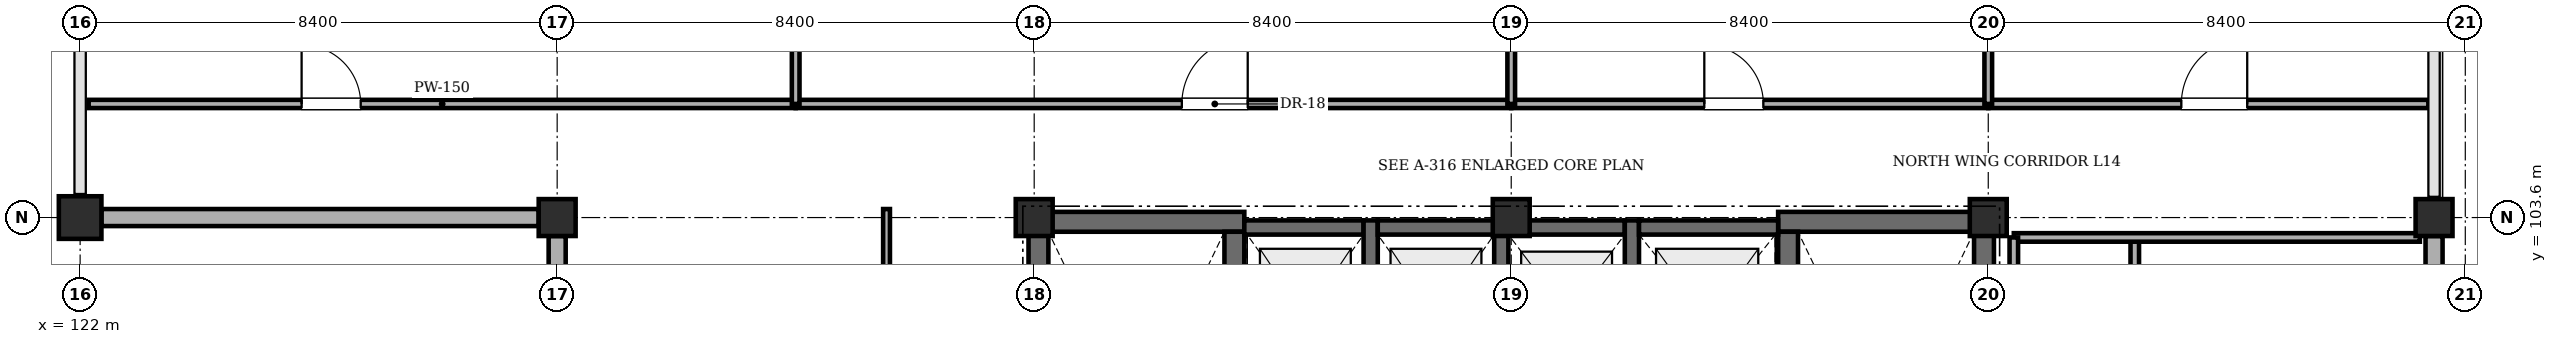
"""IFC4 building model, lengths in metres.
Left out: names, types, materials, properties, quantities, classifications, styles, units other than length and angle.
Written with IfcOpenShell. Run it as: python <this file> out.ifc"""

import sys

from ifc_helpers import new_model, si_unit, direction, frame, frame_2d, origin, origin_2d, place, context, subcontext, project, spatial, rectangle, extrude, element, fill, save


model = new_model("IFC4")
c1 = context("Model", 3, precision=1e-05, world=origin(), true_north=direction((0.0, 1.0)))
c2 = subcontext(c1, "Body", "Model", "MODEL_VIEW")
j1 = project(units=[si_unit("LENGTHUNIT", "METRE"), si_unit("PLANEANGLEUNIT", "RADIAN")], contexts=[c1])
p1 = place(None, origin())
s1 = spatial("IfcSite", under=j1, at=p1, CompositionType="ELEMENT")
p2 = place(p1, origin())
s2 = spatial("IfcBuilding", under=s1, at=p2, CompositionType="ELEMENT")
p3 = place(p2, frame((0.0, 0.0, 57.0)))
s3 = spatial("IfcBuildingStorey", under=s2, at=p3, CompositionType="ELEMENT", Elevation=57.0)
p4 = place(p3, frame((122.0, 103.6, 0.0), z_axis=(0.0, 0.0, 1.0), x_axis=(1.0, 0.0, 0.0)))
e1 = element("IfcColumn", 1, at=p4, inside=s3, PredefinedType="COLUMN", context=c2, shape_type="SweptSolid", body=[
    extrude(rectangle(XDim=0.75, YDim=0.75, at=origin_2d()), origin(), (0.0, 0.0, 1.0), 4.02),
])
for number, where, z_axis, x_axis in (
    (2, (130.4, 103.6, 0.0), (0.0, 0.0, 1.0), (1.0, 0.0, 0.0)),
    (3, (138.8, 103.6, 0.0), (0.0, 0.0, 1.0), (1.0, 0.0, 0.0)),
    (4, (147.2, 103.6, 0.0), (0.0, 0.0, 1.0), (1.0, 0.0, 0.0)),
    (5, (155.6, 103.6, 0.0), (0.0, 0.0, 1.0), (1.0, 0.0, 0.0)),
    (6, (163.45, 103.6, 0.0), (0.0, 0.0, 1.0), (1.0, 0.0, 0.0)),
):
    element("IfcColumn", number, at=place(p3, frame(where, z_axis=z_axis, x_axis=x_axis)), inside=s3, PredefinedType="COLUMN", context=c2, shape_type="SweptSolid", body=[
        extrude(rectangle(XDim=0.65, YDim=0.65, at=origin_2d()), origin(), (0.0, 0.0, 1.0), 4.02),
    ])
p5 = place(p3, frame((138.7, 103.525, 0.0), z_axis=(0.0, 0.0, 1.0), x_axis=(1.0, 0.0, 0.0)))
e7 = element("IfcWall", 7, at=p5, inside=s3, PredefinedType="SHEAR", context=c2, shape_type="SweptSolid", body=[
    extrude(rectangle(XDim=3.8, YDim=0.35, at=frame_2d((1.9, 0.0))), origin(), (0.0, 0.0, 1.0), 4.02),
])
p6 = place(p3, frame((138.875, 95.45, 0.0), z_axis=(0.0, 0.0, 1.0), x_axis=(0.0, 1.0, 0.0)))
e8 = element("IfcWall", 8, at=p6, inside=s3, PredefinedType="SHEAR", context=c2, shape_type="SweptSolid", body=[
    extrude(rectangle(XDim=7.9, YDim=0.35, at=frame_2d((3.95, 0.0))), origin(), (0.0, 0.0, 1.0), 4.02),
])
p7 = place(p3, frame((142.325, 95.45, 0.0), z_axis=(0.0, 0.0, 1.0), x_axis=(0.0, 1.0, 0.0)))
e9 = element("IfcWall", 9, at=p7, inside=s3, PredefinedType="SHEAR", context=c2, shape_type="SweptSolid", body=[
    extrude(rectangle(XDim=7.9, YDim=0.35, at=frame_2d((3.95, 0.0))), origin(), (0.0, 0.0, 1.0), 4.02),
])
p8 = place(p7, frame((0.22, 0.0, 0.0)))
e10 = element("IfcOpeningElement", 10, at=p8, cuts=e9, PredefinedType="OPENING", context=c2, shape_type="SweptSolid", body=[
    extrude(rectangle(XDim=1.15, YDim=2.15, at=frame_2d((0.575, 1.075))), frame((0.0, 0.185, 0.0), z_axis=(0.0, -1.0, 0.0), x_axis=(1.0, 0.0, 0.0)), (0.0, 0.0, 1.0), 0.37),
])
p9 = place(p3, frame((151.9, 103.525, 0.0), z_axis=(0.0, 0.0, 1.0), x_axis=(1.0, 0.0, 0.0)))
e11 = element("IfcWall", 11, at=p9, inside=s3, PredefinedType="SHEAR", context=c2, shape_type="SweptSolid", body=[
    extrude(rectangle(XDim=3.8, YDim=0.35, at=frame_2d((1.9, 0.0))), origin(), (0.0, 0.0, 1.0), 4.02),
])
p10 = place(p3, frame((152.075, 95.45, 0.0), z_axis=(0.0, 0.0, 1.0), x_axis=(0.0, 1.0, 0.0)))
e12 = element("IfcWall", 12, at=p10, inside=s3, PredefinedType="SHEAR", context=c2, shape_type="SweptSolid", body=[
    extrude(rectangle(XDim=7.9, YDim=0.35, at=frame_2d((3.95, 0.0))), origin(), (0.0, 0.0, 1.0), 4.02),
])
p11 = place(p10, frame((0.35, 0.0, 0.0)))
e13 = element("IfcOpeningElement", 13, at=p11, cuts=e12, PredefinedType="OPENING", context=c2, shape_type="SweptSolid", body=[
    extrude(rectangle(XDim=1.15, YDim=2.15, at=frame_2d((0.575, 1.075))), frame((0.0, 0.185, 0.0), z_axis=(0.0, -1.0, 0.0), x_axis=(1.0, 0.0, 0.0)), (0.0, 0.0, 1.0), 0.37),
])
p12 = place(p3, frame((155.525, 95.45, 0.0), z_axis=(0.0, 0.0, 1.0), x_axis=(0.0, 1.0, 0.0)))
e14 = element("IfcWall", 14, at=p12, inside=s3, PredefinedType="SHEAR", context=c2, shape_type="SweptSolid", body=[
    extrude(rectangle(XDim=7.9, YDim=0.35, at=frame_2d((3.95, 0.0))), origin(), (0.0, 0.0, 1.0), 4.02),
])
p13 = place(p3, frame((142.5, 103.425, 0.0), z_axis=(0.0, 0.0, 1.0), x_axis=(1.0, 0.0, 0.0)))
e15 = element("IfcWall", 15, at=p13, inside=s3, PredefinedType="SHEAR", context=c2, shape_type="SweptSolid", body=[
    extrude(rectangle(XDim=2.1, YDim=0.25, at=frame_2d((1.05, 0.0))), origin(), (0.0, 0.0, 1.0), 4.02),
])
p14 = place(p3, frame((144.725, 100.15, 0.0), z_axis=(0.0, 0.0, 1.0), x_axis=(0.0, 1.0, 0.0)))
e16 = element("IfcWall", 16, at=p14, inside=s3, PredefinedType="SHEAR", context=c2, shape_type="SweptSolid", body=[
    extrude(rectangle(XDim=3.4, YDim=0.25, at=frame_2d((1.7, 0.0))), origin(), (0.0, 0.0, 1.0), 4.02),
])
p15 = place(p3, frame((144.85, 103.425, 0.0), z_axis=(0.0, 0.0, 1.0), x_axis=(1.0, 0.0, 0.0)))
e17 = element("IfcWall", 17, at=p15, inside=s3, PredefinedType="SHEAR", context=c2, shape_type="SweptSolid", body=[
    extrude(rectangle(XDim=2.05, YDim=0.25, at=frame_2d((1.025, 0.0))), origin(), (0.0, 0.0, 1.0), 4.02),
])
p16 = place(p3, frame((147.025, 100.15, 0.0), z_axis=(0.0, 0.0, 1.0), x_axis=(0.0, 1.0, 0.0)))
e18 = element("IfcWall", 18, at=p16, inside=s3, PredefinedType="SHEAR", context=c2, shape_type="SweptSolid", body=[
    extrude(rectangle(XDim=3.4, YDim=0.25, at=frame_2d((1.7, 0.0))), origin(), (0.0, 0.0, 1.0), 4.02),
])
p17 = place(p3, frame((147.15, 103.425, 0.0), z_axis=(0.0, 0.0, 1.0), x_axis=(1.0, 0.0, 0.0)))
e19 = element("IfcWall", 19, at=p17, inside=s3, PredefinedType="SHEAR", context=c2, shape_type="SweptSolid", body=[
    extrude(rectangle(XDim=2.05, YDim=0.25, at=frame_2d((1.025, 0.0))), origin(), (0.0, 0.0, 1.0), 4.02),
])
p18 = place(p3, frame((149.325, 100.35, 0.0), z_axis=(0.0, 0.0, 1.0), x_axis=(0.0, 1.0, 0.0)))
e20 = element("IfcWall", 20, at=p18, inside=s3, PredefinedType="SHEAR", context=c2, shape_type="SweptSolid", body=[
    extrude(rectangle(XDim=3.2, YDim=0.25, at=frame_2d((1.6, 0.0))), origin(), (0.0, 0.0, 1.0), 4.02),
])
p19 = place(p3, frame((149.45, 103.425, 0.0), z_axis=(0.0, 0.0, 1.0), x_axis=(1.0, 0.0, 0.0)))
e21 = element("IfcWall", 21, at=p19, inside=s3, PredefinedType="SHEAR", context=c2, shape_type="SweptSolid", body=[
    extrude(rectangle(XDim=2.45, YDim=0.25, at=frame_2d((1.225, 0.0))), origin(), (0.0, 0.0, 1.0), 4.02),
])
p20 = place(p3, frame((163.45, 103.275, 0.0), z_axis=(0.0, 0.0, 1.0), x_axis=(0.0, -1.0, 0.0)))
e22 = element("IfcWall", 22, at=p20, inside=s3, PredefinedType="STANDARD", context=c2, shape_type="SweptSolid", body=[
    extrude(rectangle(XDim=7.75, YDim=0.3, at=frame_2d((3.875, 0.0))), origin(), (0.0, 0.0, 1.0), 3.32),
])
p21 = place(p20, frame((1.15, 0.0, 1.1)))
e23 = element("IfcOpeningElement", 23, at=p21, cuts=e22, PredefinedType="OPENING", context=c2, shape_type="SweptSolid", body=[
    extrude(rectangle(XDim=1.4, YDim=1.4, at=frame_2d((0.7, 0.7))), frame((0.0, 0.16, 0.0), z_axis=(0.0, -1.0, 0.0), x_axis=(1.0, 0.0, 0.0)), (0.0, 0.0, 1.0), 0.32),
])
p22 = place(p3, frame((130.4, 95.525, 0.0), z_axis=(0.0, 0.0, 1.0), x_axis=(0.0, 1.0, 0.0)))
e24 = element("IfcWall", 24, at=p22, inside=s3, PredefinedType="STANDARD", context=c2, shape_type="SweptSolid", body=[
    extrude(rectangle(XDim=7.75, YDim=0.3, at=frame_2d((3.875, 0.0))), origin(), (0.0, 0.0, 1.0), 3.32),
])
p23 = place(p22, frame((2.4, 0.0, 1.0)))
e25 = element("IfcOpeningElement", 25, at=p23, cuts=e24, PredefinedType="OPENING", context=c2, shape_type="SweptSolid", body=[
    extrude(rectangle(XDim=1.8, YDim=1.8, at=frame_2d((0.9, 0.9))), frame((0.0, 0.16, 0.0), z_axis=(0.0, -1.0, 0.0), x_axis=(1.0, 0.0, 0.0)), (0.0, 0.0, 1.0), 0.32),
])
p24 = place(p3, frame((130.075, 103.6, 0.0), z_axis=(0.0, 0.0, 1.0), x_axis=(-1.0, 0.0, 0.0)))
e26 = element("IfcWall", 26, at=p24, inside=s3, PredefinedType="STANDARD", context=c2, shape_type="SweptSolid", body=[
    extrude(rectangle(XDim=7.7, YDim=0.3, at=frame_2d((3.85, 0.0))), origin(), (0.0, 0.0, 1.0), 3.32),
])
p25 = place(p3, frame((158.18, 94.68, 0.0), z_axis=(0.0, 0.0, 1.0), x_axis=(0.0, 1.0, 0.0)))
e27 = element("IfcWall", 27, at=p25, inside=s3, PredefinedType="PARTITIONING", context=c2, shape_type="SweptSolid", body=[
    extrude(rectangle(XDim=8.57, YDim=0.15, at=frame_2d((4.285, 0.0))), origin(), (0.0, 0.0, 1.0), 4.02),
])
p26 = place(p25, frame((0.8, 0.0, 0.0)))
e28 = element("IfcOpeningElement", 28, at=p26, cuts=e27, PredefinedType="OPENING", context=c2, shape_type="SweptSolid", body=[
    extrude(rectangle(XDim=1.0, YDim=2.12, at=frame_2d((0.5, 1.06))), frame((0.0, 0.085, 0.0), z_axis=(0.0, -1.0, 0.0), x_axis=(1.0, 0.0, 0.0)), (0.0, 0.0, 1.0), 0.17),
])
p27 = place(p25, frame((3.5, 0.0, 0.0)))
e29 = element("IfcOpeningElement", 29, at=p27, cuts=e27, PredefinedType="OPENING", context=c2, shape_type="SweptSolid", body=[
    extrude(rectangle(XDim=0.92, YDim=2.1, at=frame_2d((0.46, 1.05))), frame((0.0, 0.085, 0.0), z_axis=(0.0, -1.0, 0.0), x_axis=(1.0, 0.0, 0.0)), (0.0, 0.0, 1.0), 0.17),
])
p28 = place(p25, frame((6.4, 0.0, 0.0)))
e30 = element("IfcOpeningElement", 30, at=p28, cuts=e27, PredefinedType="OPENING", context=c2, shape_type="SweptSolid", body=[
    extrude(rectangle(XDim=0.92, YDim=2.1, at=frame_2d((0.46, 1.05))), frame((0.0, 0.085, 0.0), z_axis=(0.0, -1.0, 0.0), x_axis=(1.0, 0.0, 0.0)), (0.0, 0.0, 1.0), 0.17),
])
p29 = place(p3, frame((156.05, 103.25, 0.0), z_axis=(0.0, 0.0, 1.0), x_axis=(1.0, 0.0, 0.0)))
e31 = element("IfcWall", 31, at=p29, inside=s3, PredefinedType="PARTITIONING", context=c2, shape_type="SweptSolid", body=[
    extrude(rectangle(XDim=7.15, YDim=0.15, at=frame_2d((3.575, 0.0))), origin(), (0.0, 0.0, 1.0), 4.02),
])
p30 = place(p3, frame((156.05, 94.68, 0.0), z_axis=(0.0, 0.0, 1.0), x_axis=(0.0, 1.0, 0.0)))
e32 = element("IfcWall", 32, at=p30, inside=s3, PredefinedType="PARTITIONING", context=c2, shape_type="SweptSolid", body=[
    extrude(rectangle(XDim=8.57, YDim=0.15, at=frame_2d((4.285, 0.0))), origin(), (0.0, 0.0, 1.0), 4.02),
])
p31 = place(p3, frame((136.2, 94.68, 0.0), z_axis=(0.0, 0.0, 1.0), x_axis=(0.0, 1.0, 0.0)))
e33 = element("IfcWall", 33, at=p31, inside=s3, PredefinedType="PARTITIONING", context=c2, shape_type="SweptSolid", body=[
    extrude(rectangle(XDim=9.07, YDim=0.12, at=frame_2d((4.535, 0.0))), origin(), (0.0, 0.0, 1.0), 4.02),
])
p32 = place(p3, frame((122.15, 105.6, 0.0), z_axis=(0.0, 0.0, 1.0), x_axis=(1.0, 0.0, 0.0)))
e34 = element("IfcWall", 34, at=p32, inside=s3, PredefinedType="PARTITIONING", context=c2, shape_type="SweptSolid", body=[
    extrude(rectangle(XDim=12.45, YDim=0.145, at=frame_2d((6.225, 0.0))), origin(), (0.0, 0.0, 1.0), 4.02),
])
p33 = place(p32, frame((3.75, 0.0, 0.0)))
e35 = element("IfcOpeningElement", 35, at=p33, cuts=e34, PredefinedType="OPENING", context=c2, shape_type="SweptSolid", body=[
    extrude(rectangle(XDim=1.04, YDim=2.16, at=frame_2d((0.52, 1.08))), frame((0.0, 0.083, 0.0), z_axis=(0.0, -1.0, 0.0), x_axis=(1.0, 0.0, 0.0)), (0.0, 0.0, 1.0), 0.165),
])
p34 = place(p3, frame((134.6, 105.6, 0.0), z_axis=(0.0, 0.0, 1.0), x_axis=(1.0, 0.0, 0.0)))
e36 = element("IfcWall", 36, at=p34, inside=s3, PredefinedType="PARTITIONING", context=c2, shape_type="SweptSolid", body=[
    extrude(rectangle(XDim=12.6, YDim=0.145, at=frame_2d((6.3, 0.0))), origin(), (0.0, 0.0, 1.0), 4.02),
])
p35 = place(p34, frame((6.8, 0.0, 0.0)))
e37 = element("IfcOpeningElement", 37, at=p35, cuts=e36, PredefinedType="OPENING", context=c2, shape_type="SweptSolid", body=[
    extrude(rectangle(XDim=1.16, YDim=2.2, at=frame_2d((0.58, 1.1))), frame((0.0, 0.083, 0.0), z_axis=(0.0, -1.0, 0.0), x_axis=(1.0, 0.0, 0.0)), (0.0, 0.0, 1.0), 0.165),
])
p36 = place(p3, frame((134.6, 105.6, 0.0), z_axis=(0.0, 0.0, 1.0), x_axis=(0.0, 1.0, 0.0)))
e38 = element("IfcWall", 38, at=p36, inside=s3, PredefinedType="PARTITIONING", context=c2, shape_type="SweptSolid", body=[
    extrude(rectangle(XDim=5.75, YDim=0.135, at=frame_2d((2.875, 0.0))), origin(), (0.0, 0.0, 1.0), 3.57),
])
p37 = place(p3, frame((147.2, 105.6, 0.0), z_axis=(0.0, 0.0, 1.0), x_axis=(1.0, 0.0, 0.0)))
e39 = element("IfcWall", 39, at=p37, inside=s3, PredefinedType="PARTITIONING", context=c2, shape_type="SweptSolid", body=[
    extrude(rectangle(XDim=8.4, YDim=0.145, at=frame_2d((4.2, 0.0))), origin(), (0.0, 0.0, 1.0), 4.02),
])
p38 = place(p37, frame((3.4, 0.0, 0.0)))
e40 = element("IfcOpeningElement", 40, at=p38, cuts=e39, PredefinedType="OPENING", context=c2, shape_type="SweptSolid", body=[
    extrude(rectangle(XDim=1.04, YDim=2.16, at=frame_2d((0.52, 1.08))), frame((0.0, 0.083, 0.0), z_axis=(0.0, -1.0, 0.0), x_axis=(1.0, 0.0, 0.0)), (0.0, 0.0, 1.0), 0.165),
])
p39 = place(p3, frame((147.2, 105.6, 0.0), z_axis=(0.0, 0.0, 1.0), x_axis=(0.0, 1.0, 0.0)))
e41 = element("IfcWall", 41, at=p39, inside=s3, PredefinedType="PARTITIONING", context=c2, shape_type="SweptSolid", body=[
    extrude(rectangle(XDim=5.75, YDim=0.135, at=frame_2d((2.875, 0.0))), origin(), (0.0, 0.0, 1.0), 3.32),
])
p40 = place(p3, frame((155.6, 105.6, 0.0), z_axis=(0.0, 0.0, 1.0), x_axis=(1.0, 0.0, 0.0)))
e42 = element("IfcWall", 42, at=p40, inside=s3, PredefinedType="PARTITIONING", context=c2, shape_type="SweptSolid", body=[
    extrude(rectangle(XDim=7.75, YDim=0.145, at=frame_2d((3.875, 0.0))), origin(), (0.0, 0.0, 1.0), 4.02),
])
p41 = place(p40, frame((3.4, 0.0, 0.0)))
e43 = element("IfcOpeningElement", 43, at=p41, cuts=e42, PredefinedType="OPENING", context=c2, shape_type="SweptSolid", body=[
    extrude(rectangle(XDim=1.16, YDim=2.2, at=frame_2d((0.58, 1.1))), frame((0.0, 0.083, 0.0), z_axis=(0.0, -1.0, 0.0), x_axis=(1.0, 0.0, 0.0)), (0.0, 0.0, 1.0), 0.165),
])
p42 = place(p3, frame((155.6, 105.6, 0.0), z_axis=(0.0, 0.0, 1.0), x_axis=(0.0, 1.0, 0.0)))
e44 = element("IfcWall", 44, at=p42, inside=s3, PredefinedType="PARTITIONING", context=c2, shape_type="SweptSolid", body=[
    extrude(rectangle(XDim=5.75, YDim=0.135, at=frame_2d((2.875, 0.0))), origin(), (0.0, 0.0, 1.0), 3.32),
])
p43 = place(p33, origin())
e45 = element("IfcDoor", 45, at=p43, inside=s3, OperationType="SINGLE_SWING_LEFT", PredefinedType="DOOR", context=c2, shape_type="SweptSolid", body=[
    extrude(rectangle(XDim=1.04, YDim=2.16, at=frame_2d((0.52, 1.08))), frame((0.0, 0.025, 0.0), z_axis=(0.0, -1.0, 0.0), x_axis=(1.0, 0.0, 0.0)), (0.0, 0.0, 1.0), 0.05),
])
fill(e35, e45)
p44 = place(p35, origin())
e46 = element("IfcDoor", 46, at=p44, inside=s3, OperationType="SINGLE_SWING_RIGHT", PredefinedType="DOOR", context=c2, shape_type="SweptSolid", body=[
    extrude(rectangle(XDim=1.16, YDim=2.2, at=frame_2d((0.58, 1.1))), frame((0.0, 0.025, 0.0), z_axis=(0.0, -1.0, 0.0), x_axis=(1.0, 0.0, 0.0)), (0.0, 0.0, 1.0), 0.05),
])
fill(e37, e46)
p45 = place(p38, origin())
e47 = element("IfcDoor", 47, at=p45, inside=s3, OperationType="SINGLE_SWING_LEFT", PredefinedType="DOOR", context=c2, shape_type="SweptSolid", body=[
    extrude(rectangle(XDim=1.04, YDim=2.16, at=frame_2d((0.52, 1.08))), frame((0.0, 0.025, 0.0), z_axis=(0.0, -1.0, 0.0), x_axis=(1.0, 0.0, 0.0)), (0.0, 0.0, 1.0), 0.05),
])
fill(e40, e47)
p46 = place(p41, origin())
e48 = element("IfcDoor", 48, at=p46, inside=s3, OperationType="SINGLE_SWING_RIGHT", PredefinedType="DOOR", context=c2, shape_type="SweptSolid", body=[
    extrude(rectangle(XDim=1.16, YDim=2.2, at=frame_2d((0.58, 1.1))), frame((0.0, 0.025, 0.0), z_axis=(0.0, -1.0, 0.0), x_axis=(1.0, 0.0, 0.0)), (0.0, 0.0, 1.0), 0.05),
])
fill(e43, e48)
save(model, sys.argv[1])
